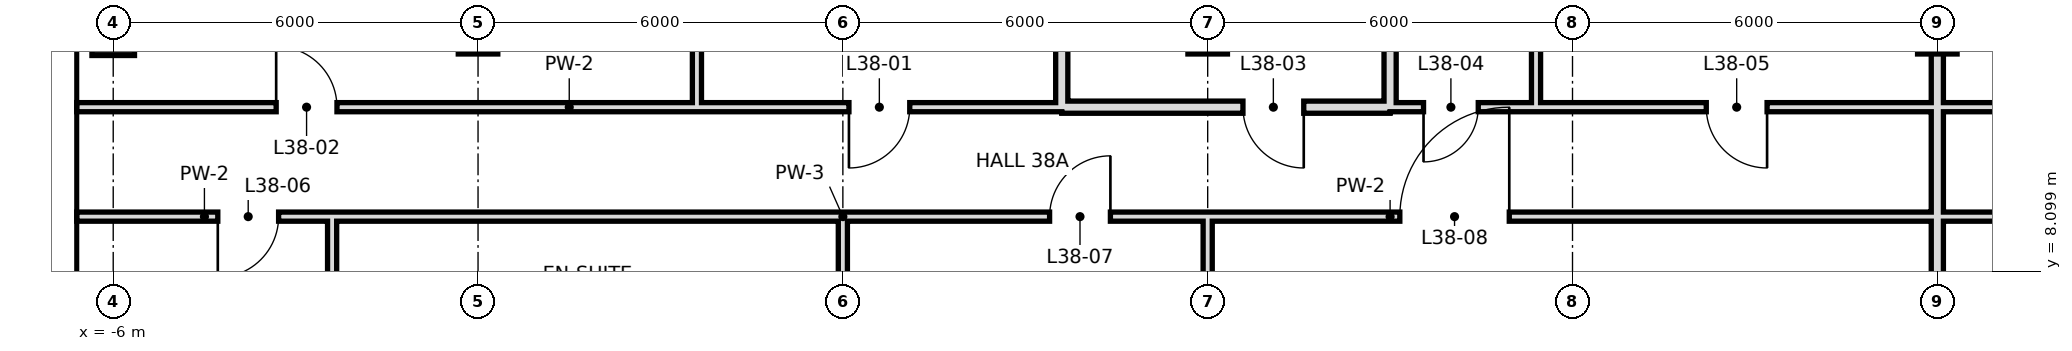
"""IFC4 building model, lengths in metres.
Left out: names, types, materials, properties, quantities, classifications, styles, units other than length and angle.
Written with IfcOpenShell. Run it as: python <this file> out.ifc"""

import sys

from ifc_helpers import new_model, si_unit, direction, frame, frame_2d, origin, origin_2d, place, context, subcontext, project, spatial, rectangle, hollow_rectangle, extrude, element, fill, save


model = new_model("IFC4")
c1 = context("Model", 3, precision=1e-05, world=origin(), true_north=direction((0.0, 1.0)))
c2 = subcontext(c1, "Body", "Model", "MODEL_VIEW")
j1 = project(units=[si_unit("LENGTHUNIT", "METRE"), si_unit("PLANEANGLEUNIT", "RADIAN")], contexts=[c1])
p1 = place(None, origin())
s1 = spatial("IfcSite", under=j1, at=p1, CompositionType="ELEMENT")
p2 = place(p1, origin())
s2 = spatial("IfcBuilding", under=s1, at=p2, CompositionType="ELEMENT")
p3 = place(p2, frame((0.0, 0.0, 167.2)))
s3 = spatial("IfcBuildingStorey", under=s2, at=p3, CompositionType="ELEMENT", Elevation=167.2)
p4 = place(p3, frame((-6.0, 12.0, 0.0), z_axis=(0.0, 0.0, 1.0), x_axis=(1.0, 0.0, 0.0)))
e1 = element("IfcColumn", 1, at=p4, inside=s3, PredefinedType="COLUMN", context=c2, shape_type="SweptSolid", body=[
    extrude(hollow_rectangle(XDim=0.7, YDim=0.7, WallThickness=0.036, at=origin_2d()), origin(), (0.0, 0.0, 1.0), 3.6),
])
for number, where, z_axis, x_axis in (
    (2, (0.0, 12.0, 0.0), (0.0, 0.0, 1.0), (1.0, 0.0, 0.0)),
    (3, (12.0, 12.0, 0.0), (0.0, 0.0, 1.0), (1.0, 0.0, 0.0)),
    (4, (24.0, 12.0, 0.0), (0.0, 0.0, 1.0), (1.0, 0.0, 0.0)),
):
    element("IfcColumn", number, at=place(p3, frame(where, z_axis=z_axis, x_axis=x_axis)), inside=s3, PredefinedType="COLUMN", context=c2, shape_type="SweptSolid", body=[
        extrude(hollow_rectangle(XDim=0.65, YDim=0.65, WallThickness=0.032, at=origin_2d()), origin(), (0.0, 0.0, 1.0), 3.6),
    ])
p5 = place(p3, frame((-2.4, 6.0, 0.0), z_axis=(0.0, 0.0, 1.0), x_axis=(0.0, 1.0, 0.0)))
e5 = element("IfcWall", 5, at=p5, inside=s3, PredefinedType="PARTITIONING", context=c2, shape_type="SweptSolid", body=[
    extrude(rectangle(XDim=3.0, YDim=0.15, at=frame_2d((1.5, 0.0))), origin(), (0.0, 0.0, 1.0), 3.42),
])
p6 = place(p3, frame((12.0, 0.0, 0.0), z_axis=(0.0, 0.0, 1.0), x_axis=(0.0, 1.0, 0.0)))
e6 = element("IfcWall", 6, at=p6, inside=s3, PredefinedType="PARTITIONING", context=c2, shape_type="SweptSolid", body=[
    extrude(rectangle(XDim=9.0, YDim=0.15, at=frame_2d((4.5, 0.0))), origin(), (0.0, 0.0, 1.0), 2.72),
])
p7 = place(p3, frame((15.0, 10.8, 0.0), z_axis=(0.0, 0.0, 1.0), x_axis=(0.0, 1.0, 0.0)))
e7 = element("IfcWall", 7, at=p7, inside=s3, PredefinedType="SOLIDWALL", context=c2, shape_type="SweptSolid", body=[
    extrude(rectangle(XDim=4.5, YDim=0.2, at=frame_2d((2.25, 0.0))), origin(), (0.0, 0.0, 1.0), 2.72),
])
p8 = place(p3, frame((17.4, 10.8, 0.0), z_axis=(0.0, 0.0, 1.0), x_axis=(0.0, 1.0, 0.0)))
e8 = element("IfcWall", 8, at=p8, inside=s3, PredefinedType="PARTITIONING", context=c2, shape_type="SweptSolid", body=[
    extrude(rectangle(XDim=4.5, YDim=0.15, at=frame_2d((2.25, 0.0))), origin(), (0.0, 0.0, 1.0), 3.42),
])
p9 = place(p3, frame((24.0, 0.0, 0.0), z_axis=(0.0, 0.0, 1.0), x_axis=(0.0, 1.0, 0.0)))
e9 = element("IfcWall", 9, at=p9, inside=s3, PredefinedType="SOLIDWALL", context=c2, shape_type="SweptSolid", body=[
    extrude(rectangle(XDim=15.3, YDim=0.2, at=frame_2d((7.65, 0.0))), origin(), (0.0, 0.0, 1.0), 2.72),
])
p10 = place(p3, frame((3.6, 10.8, 0.0), z_axis=(0.0, 0.0, 1.0), x_axis=(0.0, 1.0, 0.0)))
e10 = element("IfcWall", 10, at=p10, inside=s3, PredefinedType="PARTITIONING", context=c2, shape_type="SweptSolid", body=[
    extrude(rectangle(XDim=4.5, YDim=0.15, at=frame_2d((2.25, 0.0))), origin(), (0.0, 0.0, 1.0), 3.42),
])
p11 = place(p3, frame((6.0, 6.0, 0.0), z_axis=(0.0, 0.0, 1.0), x_axis=(0.0, 1.0, 0.0)))
e11 = element("IfcWall", 11, at=p11, inside=s3, PredefinedType="PARTITIONING", context=c2, shape_type="SweptSolid", body=[
    extrude(rectangle(XDim=3.0, YDim=0.15, at=frame_2d((1.5, 0.0))), origin(), (0.0, 0.0, 1.0), 2.72),
])
p12 = place(p3, frame((9.6, 10.8, 0.0), z_axis=(0.0, 0.0, 1.0), x_axis=(0.0, 1.0, 0.0)))
e12 = element("IfcWall", 12, at=p12, inside=s3, PredefinedType="SOLIDWALL", context=c2, shape_type="SweptSolid", body=[
    extrude(rectangle(XDim=4.5, YDim=0.2, at=frame_2d((2.25, 0.0))), origin(), (0.0, 0.0, 1.0), 2.72),
])
p13 = place(p3, frame((9.6, 10.8, 0.0), z_axis=(0.0, 0.0, 1.0), x_axis=(1.0, 0.0, 0.0)))
e13 = element("IfcWall", 13, at=p13, inside=s3, PredefinedType="SOLIDWALL", context=c2, shape_type="SweptSolid", body=[
    extrude(rectangle(XDim=5.4, YDim=0.2, at=frame_2d((2.7, 0.0))), origin(), (0.0, 0.0, 1.0), 2.72),
])
p14 = place(p13, frame((2.98, 0.0, 0.0)))
e14 = element("IfcOpeningElement", 14, at=p14, cuts=e13, PredefinedType="OPENING", context=c2, shape_type="SweptSolid", body=[
    extrude(rectangle(XDim=1.0, YDim=2.4, at=frame_2d((0.5, 1.2))), frame((0.0, 0.11, 0.0), z_axis=(0.0, -1.0, 0.0), x_axis=(1.0, 0.0, 0.0)), (0.0, 0.0, 1.0), 0.22),
])
p15 = place(p3, frame((-6.6, 10.8, 0.0), z_axis=(0.0, 0.0, 1.0), x_axis=(1.0, 0.0, 0.0)))
e15 = element("IfcWall", 15, at=p15, inside=s3, PredefinedType="PARTITIONING", context=c2, shape_type="SweptSolid", body=[
    extrude(rectangle(XDim=16.2, YDim=0.15, at=frame_2d((8.1, 0.0))), origin(), (0.0, 0.0, 1.0), 3.42),
])
p16 = place(p15, frame((12.7, 0.0, 0.0)))
e16 = element("IfcOpeningElement", 16, at=p16, cuts=e15, PredefinedType="OPENING", context=c2, shape_type="SweptSolid", body=[
    extrude(rectangle(XDim=1.0, YDim=2.4, at=frame_2d((0.5, 1.2))), frame((0.0, 0.085, 0.0), z_axis=(0.0, -1.0, 0.0), x_axis=(1.0, 0.0, 0.0)), (0.0, 0.0, 1.0), 0.17),
])
p17 = place(p15, frame((3.28, 0.0, 0.0)))
e17 = element("IfcOpeningElement", 17, at=p17, cuts=e15, PredefinedType="OPENING", context=c2, shape_type="SweptSolid", body=[
    extrude(rectangle(XDim=1.0, YDim=2.4, at=frame_2d((0.5, 1.2))), frame((0.0, 0.085, 0.0), z_axis=(0.0, -1.0, 0.0), x_axis=(1.0, 0.0, 0.0)), (0.0, 0.0, 1.0), 0.17),
])
p18 = place(p3, frame((17.4, 10.8, 0.0), z_axis=(0.0, 0.0, 1.0), x_axis=(1.0, 0.0, 0.0)))
e18 = element("IfcWall", 18, at=p18, inside=s3, PredefinedType="PARTITIONING", context=c2, shape_type="SweptSolid", body=[
    extrude(rectangle(XDim=22.8, YDim=0.15, at=frame_2d((11.4, 0.0))), origin(), (0.0, 0.0, 1.0), 3.42),
])
p19 = place(p18, frame((2.8, 0.0, 0.0)))
e19 = element("IfcOpeningElement", 19, at=p19, cuts=e18, PredefinedType="OPENING", context=c2, shape_type="SweptSolid", body=[
    extrude(rectangle(XDim=1.0, YDim=2.4, at=frame_2d((0.5, 1.2))), frame((0.0, 0.085, 0.0), z_axis=(0.0, -1.0, 0.0), x_axis=(1.0, 0.0, 0.0)), (0.0, 0.0, 1.0), 0.17),
])
p20 = place(p18, frame((19.24, 0.0, 0.0)))
e20 = element("IfcOpeningElement", 20, at=p20, cuts=e18, PredefinedType="OPENING", context=c2, shape_type="SweptSolid", body=[
    extrude(rectangle(XDim=1.0, YDim=2.4, at=frame_2d((0.5, 1.2))), frame((0.0, 0.085, 0.0), z_axis=(0.0, -1.0, 0.0), x_axis=(1.0, 0.0, 0.0)), (0.0, 0.0, 1.0), 0.17),
])
p21 = place(p18, frame((11.8, 0.0, 0.0)))
e21 = element("IfcOpeningElement", 21, at=p21, cuts=e18, PredefinedType="OPENING", context=c2, shape_type="SweptSolid", body=[
    extrude(rectangle(XDim=1.0, YDim=2.4, at=frame_2d((0.5, 1.2))), frame((0.0, 0.085, 0.0), z_axis=(0.0, -1.0, 0.0), x_axis=(1.0, 0.0, 0.0)), (0.0, 0.0, 1.0), 0.17),
])
p22 = place(p3, frame((15.0, 10.8, 0.0), z_axis=(0.0, 0.0, 1.0), x_axis=(1.0, 0.0, 0.0)))
e22 = element("IfcWall", 22, at=p22, inside=s3, PredefinedType="PARTITIONING", context=c2, shape_type="SweptSolid", body=[
    extrude(rectangle(XDim=2.4, YDim=0.15, at=frame_2d((1.2, 0.0))), origin(), (0.0, 0.0, 1.0), 3.42),
])
p23 = place(p22, frame((0.55, 0.0, 0.0)))
e23 = element("IfcOpeningElement", 23, at=p23, cuts=e22, PredefinedType="OPENING", context=c2, shape_type="SweptSolid", body=[
    extrude(rectangle(XDim=0.9, YDim=2.4, at=frame_2d((0.45, 1.2))), frame((0.0, 0.085, 0.0), z_axis=(0.0, -1.0, 0.0), x_axis=(1.0, 0.0, 0.0)), (0.0, 0.0, 1.0), 0.17),
])
p24 = place(p3, frame((-6.6, 9.0, 0.0), z_axis=(0.0, 0.0, 1.0), x_axis=(1.0, 0.0, 0.0)))
e24 = element("IfcWall", 24, at=p24, inside=s3, PredefinedType="PARTITIONING", context=c2, shape_type="SweptSolid", body=[
    extrude(rectangle(XDim=4.2, YDim=0.15, at=frame_2d((2.1, 0.0))), origin(), (0.0, 0.0, 1.0), 3.42),
])
p25 = place(p24, frame((2.32, 0.0, 0.0)))
e25 = element("IfcOpeningElement", 25, at=p25, cuts=e24, PredefinedType="OPENING", context=c2, shape_type="SweptSolid", body=[
    extrude(rectangle(XDim=1.0, YDim=2.4, at=frame_2d((0.5, 1.2))), frame((0.0, 0.085, 0.0), z_axis=(0.0, -1.0, 0.0), x_axis=(1.0, 0.0, 0.0)), (0.0, 0.0, 1.0), 0.17),
])
p26 = place(p3, frame((6.0, 9.0, 0.0), z_axis=(0.0, 0.0, 1.0), x_axis=(1.0, 0.0, 0.0)))
e26 = element("IfcWall", 26, at=p26, inside=s3, PredefinedType="PARTITIONING", context=c2, shape_type="SweptSolid", body=[
    extrude(rectangle(XDim=18.0, YDim=0.15, at=frame_2d((9.0, 0.0))), origin(), (0.0, 0.0, 1.0), 3.42),
])
p27 = place(p26, frame((3.4, 0.0, 0.0)))
e27 = element("IfcOpeningElement", 27, at=p27, cuts=e26, PredefinedType="OPENING", context=c2, shape_type="SweptSolid", body=[
    extrude(rectangle(XDim=1.0, YDim=2.4, at=frame_2d((0.5, 1.2))), frame((0.0, 0.085, 0.0), z_axis=(0.0, -1.0, 0.0), x_axis=(1.0, 0.0, 0.0)), (0.0, 0.0, 1.0), 0.17),
])
p28 = place(p26, frame((9.16, 0.0, 0.0)))
e28 = element("IfcOpeningElement", 28, at=p28, cuts=e26, PredefinedType="OPENING", context=c2, shape_type="SweptSolid", body=[
    extrude(rectangle(XDim=1.8, YDim=2.4, at=frame_2d((0.9, 1.2))), frame((0.0, 0.085, 0.0), z_axis=(0.0, -1.0, 0.0), x_axis=(1.0, 0.0, 0.0)), (0.0, 0.0, 1.0), 0.17),
])
p29 = place(p3, frame((-2.4, 9.0, 0.0), z_axis=(0.0, 0.0, 1.0), x_axis=(1.0, 0.0, 0.0)))
e29 = element("IfcWall", 29, at=p29, inside=s3, PredefinedType="PARTITIONING", context=c2, shape_type="SweptSolid", body=[
    extrude(rectangle(XDim=8.4, YDim=0.15, at=frame_2d((4.2, 0.0))), origin(), (0.0, 0.0, 1.0), 3.42),
])
p30 = place(p3, frame((24.0, 9.0, 0.0), z_axis=(0.0, 0.0, 1.0), x_axis=(1.0, 0.0, 0.0)))
e30 = element("IfcWall", 30, at=p30, inside=s3, PredefinedType="PARTITIONING", context=c2, shape_type="SweptSolid", body=[
    extrude(rectangle(XDim=3.6, YDim=0.15, at=frame_2d((1.8, 0.0))), origin(), (0.0, 0.0, 1.0), 3.42),
])
p31 = place(p16, frame((1.0, 0.0, 0.0), z_axis=(0.0, 0.0, 1.0), x_axis=(-1.0, 0.0, 0.0)))
e31 = element("IfcDoor", 31, at=p31, inside=s3, OperationType="SINGLE_SWING_RIGHT", PredefinedType="DOOR", context=c2, shape_type="SweptSolid", body=[
    extrude(rectangle(XDim=1.0, YDim=2.4, at=frame_2d((0.5, 1.2))), frame((0.0, 0.025, 0.0), z_axis=(0.0, -1.0, 0.0), x_axis=(1.0, 0.0, 0.0)), (0.0, 0.0, 1.0), 0.05),
])
fill(e16, e31)
p32 = place(p17, origin())
e32 = element("IfcDoor", 32, at=p32, inside=s3, OperationType="SINGLE_SWING_LEFT", PredefinedType="DOOR", context=c2, shape_type="SweptSolid", body=[
    extrude(rectangle(XDim=1.0, YDim=2.4, at=frame_2d((0.5, 1.2))), frame((0.0, 0.025, 0.0), z_axis=(0.0, -1.0, 0.0), x_axis=(1.0, 0.0, 0.0)), (0.0, 0.0, 1.0), 0.05),
])
fill(e17, e32)
p33 = place(p14, origin())
e33 = element("IfcDoor", 33, at=p33, inside=s3, OperationType="SINGLE_SWING_RIGHT", PredefinedType="DOOR", context=c2, shape_type="SweptSolid", body=[
    extrude(rectangle(XDim=1.0, YDim=2.4, at=frame_2d((0.5, 1.2))), frame((0.0, 0.025, 0.0), z_axis=(0.0, -1.0, 0.0), x_axis=(1.0, 0.0, 0.0)), (0.0, 0.0, 1.0), 0.05),
])
fill(e14, e33)
p34 = place(p23, frame((0.9, 0.0, 0.0), z_axis=(0.0, 0.0, 1.0), x_axis=(-1.0, 0.0, 0.0)))
e34 = element("IfcDoor", 34, at=p34, inside=s3, OperationType="SINGLE_SWING_RIGHT", PredefinedType="DOOR", context=c2, shape_type="SweptSolid", body=[
    extrude(rectangle(XDim=0.9, YDim=2.4, at=frame_2d((0.45, 1.2))), frame((0.0, 0.025, 0.0), z_axis=(0.0, -1.0, 0.0), x_axis=(1.0, 0.0, 0.0)), (0.0, 0.0, 1.0), 0.05),
])
fill(e23, e34)
p35 = place(p19, origin())
e35 = element("IfcDoor", 35, at=p35, inside=s3, OperationType="SINGLE_SWING_RIGHT", PredefinedType="DOOR", context=c2, shape_type="SweptSolid", body=[
    extrude(rectangle(XDim=1.0, YDim=2.4, at=frame_2d((0.5, 1.2))), frame((0.0, 0.025, 0.0), z_axis=(0.0, -1.0, 0.0), x_axis=(1.0, 0.0, 0.0)), (0.0, 0.0, 1.0), 0.05),
])
fill(e19, e35)
p36 = place(p25, frame((1.0, 0.0, 0.0), z_axis=(0.0, 0.0, 1.0), x_axis=(-1.0, 0.0, 0.0)))
e36 = element("IfcDoor", 36, at=p36, inside=s3, OperationType="SINGLE_SWING_RIGHT", PredefinedType="DOOR", context=c2, shape_type="SweptSolid", body=[
    extrude(rectangle(XDim=1.0, YDim=2.4, at=frame_2d((0.5, 1.2))), frame((0.0, 0.025, 0.0), z_axis=(0.0, -1.0, 0.0), x_axis=(1.0, 0.0, 0.0)), (0.0, 0.0, 1.0), 0.05),
])
fill(e25, e36)
p37 = place(p27, frame((1.0, 0.0, 0.0), z_axis=(0.0, 0.0, 1.0), x_axis=(-1.0, 0.0, 0.0)))
e37 = element("IfcDoor", 37, at=p37, inside=s3, OperationType="SINGLE_SWING_LEFT", PredefinedType="DOOR", context=c2, shape_type="SweptSolid", body=[
    extrude(rectangle(XDim=1.0, YDim=2.4, at=frame_2d((0.5, 1.2))), frame((0.0, 0.025, 0.0), z_axis=(0.0, -1.0, 0.0), x_axis=(1.0, 0.0, 0.0)), (0.0, 0.0, 1.0), 0.05),
])
fill(e27, e37)
p38 = place(p28, frame((1.8, 0.0, 0.0), z_axis=(0.0, 0.0, 1.0), x_axis=(-1.0, 0.0, 0.0)))
e38 = element("IfcDoor", 38, at=p38, inside=s3, OperationType="SINGLE_SWING_LEFT", PredefinedType="DOOR", context=c2, shape_type="SweptSolid", body=[
    extrude(rectangle(XDim=1.8, YDim=2.4, at=frame_2d((0.9, 1.2))), frame((0.0, 0.025, 0.0), z_axis=(0.0, -1.0, 0.0), x_axis=(1.0, 0.0, 0.0)), (0.0, 0.0, 1.0), 0.05),
])
fill(e28, e38)
save(model, sys.argv[1])
